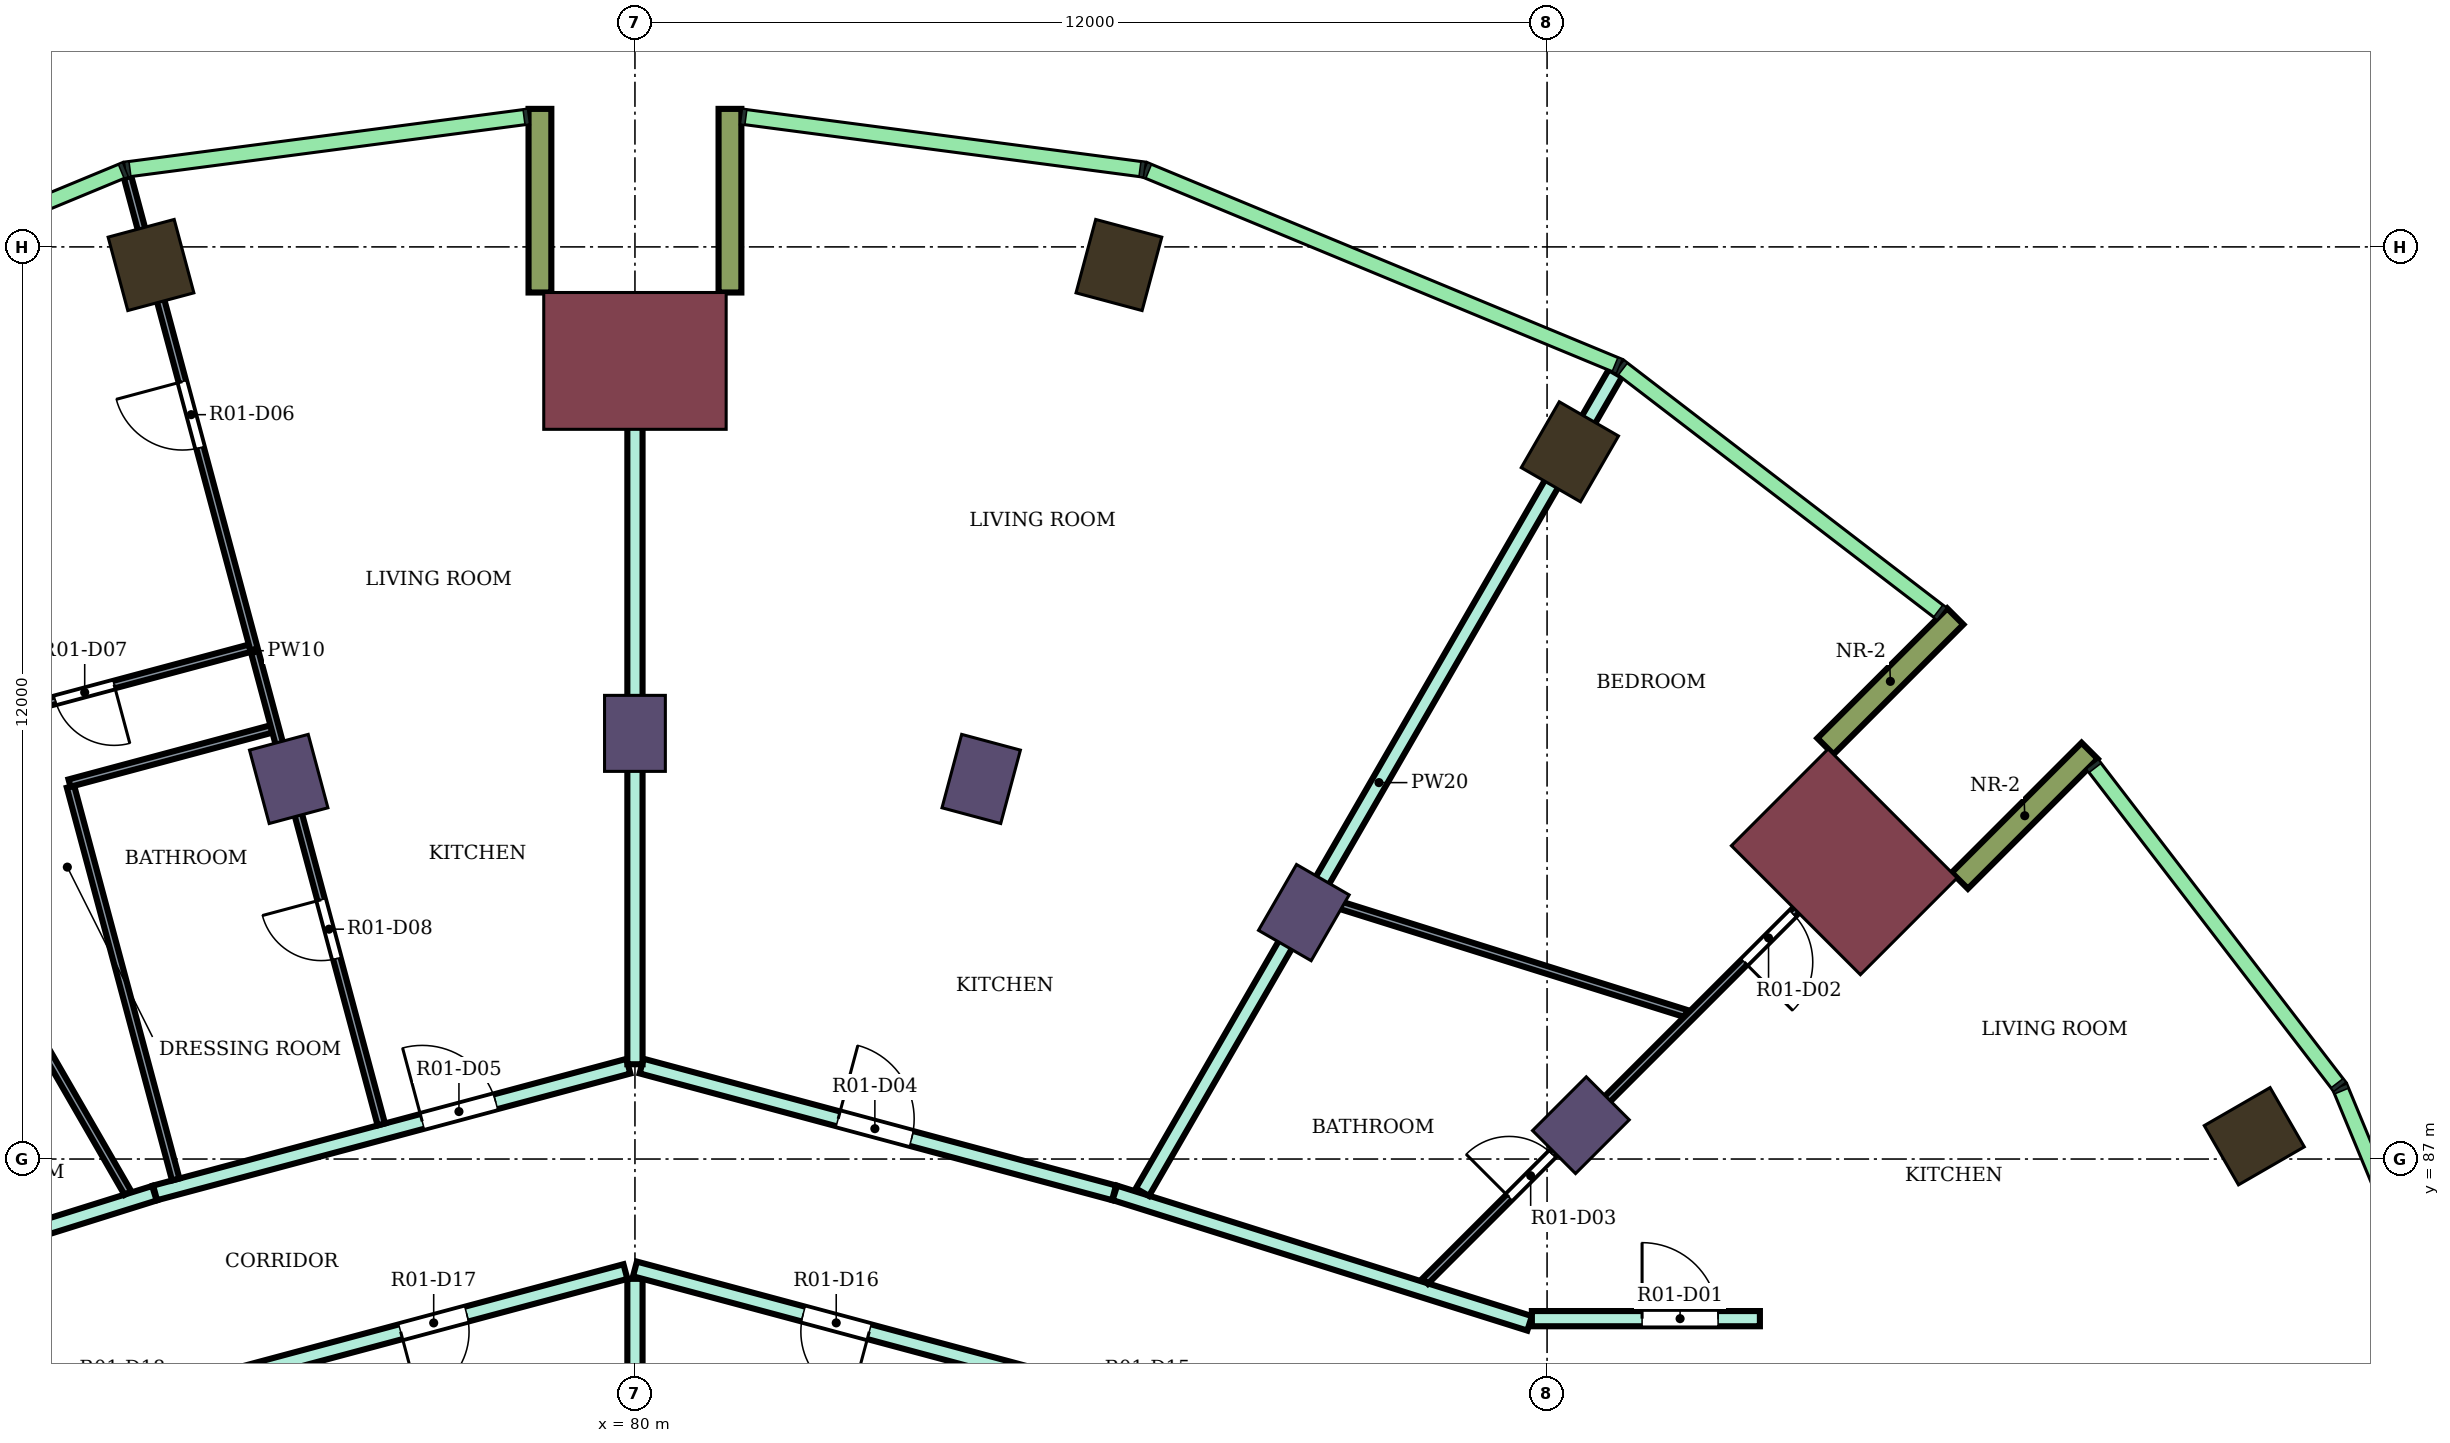
"""IFC4 building model, lengths in metres.
Left out: names, types, materials, properties, quantities, classifications, styles, units other than length and angle.
Written with IfcOpenShell. Run it as: python <this file> out.ifc"""

import sys

from ifc_helpers import new_model, si_unit, direction, frame, frame_2d, origin, origin_2d, place, context, subcontext, project, spatial, rectangle, extrude, element, fill, save


model = new_model("IFC4")
c1 = context("Model", 3, precision=1e-05, world=origin(), true_north=direction((0.0, 1.0)))
c2 = subcontext(c1, "Body", "Model", "MODEL_VIEW")
j1 = project(units=[si_unit("LENGTHUNIT", "METRE"), si_unit("PLANEANGLEUNIT", "RADIAN")], contexts=[c1])
p1 = place(None, origin())
s1 = spatial("IfcSite", under=j1, at=p1, CompositionType="ELEMENT")
p2 = place(p1, origin())
s2 = spatial("IfcBuilding", under=s1, at=p2, CompositionType="ELEMENT")
p3 = place(p2, frame((0.0, 0.0, 157.7)))
s3 = spatial("IfcBuildingStorey", under=s2, at=p3, CompositionType="ELEMENT", Elevation=157.7)
for number, where, z_axis, x_axis in (
    (1, (101.304, 87.3, 0.0), (0.0, 0.0, 1.0), (0.866, 0.5, 0.0)),
    (2, (92.3, 96.304, 0.0), (0.0, 0.0, 1.0), (0.5, 0.866, 0.0)),
    (3, (86.367, 98.762, 0.0), (0.0, 0.0, 1.0), (0.259, 0.966, 0.0)),
    (4, (73.633, 98.762, 0.0), (0.0, 0.0, 1.0), (-0.259, 0.966, 0.0)),
):
    element("IfcColumn", number, at=place(p3, frame(where, z_axis=z_axis, x_axis=x_axis)), inside=s3, PredefinedType="COLUMN", context=c2, shape_type="SweptSolid", body=[
        extrude(rectangle(XDim=1.0, YDim=0.9, at=origin_2d()), origin(), (0.0, 0.0, 1.0), 4.1),
    ])
for number, where, z_axis, x_axis in (
    (5, (92.445, 87.445, 0.0), (0.0, 0.0, 1.0), (0.707, 0.707, 0.0)),
    (6, (88.8, 90.242, 0.0), (0.0, 0.0, 1.0), (0.5, 0.866, 0.0)),
    (7, (84.555, 92.0, 0.0), (0.0, 0.0, 1.0), (0.259, 0.966, 0.0)),
    (8, (80.0, 92.6, 0.0), (0.0, 0.0, 1.0), (0.0, 1.0, 0.0)),
    (9, (75.445, 92.0, 0.0), (0.0, 0.0, 1.0), (-0.259, 0.966, 0.0)),
):
    element("IfcColumn", number, at=place(p3, frame(where, z_axis=z_axis, x_axis=x_axis)), inside=s3, PredefinedType="COLUMN", context=c2, shape_type="SweptSolid", body=[
        extrude(rectangle(XDim=1.0, YDim=0.8, at=origin_2d()), origin(), (0.0, 0.0, 1.0), 4.1),
    ])
for number, where, z_axis, x_axis in (
    (10, (95.91, 90.91, 0.0), (0.0, 0.0, 1.0), (0.707, 0.707, 0.0)),
    (11, (80.0, 97.5, 0.0), (0.0, 0.0, 1.0), (0.0, 1.0, 0.0)),
):
    element("IfcColumn", number, at=place(p3, frame(where, z_axis=z_axis, x_axis=x_axis)), inside=s3, PredefinedType="COLUMN", context=c2, shape_type="SweptSolid", body=[
        extrude(rectangle(XDim=1.8, YDim=2.4, at=origin_2d()), origin(), (0.0, 0.0, 1.0), 4.1),
    ])
for number, where, z_axis, x_axis in (
    (12, (97.43, 90.662, 0.0), (0.0, 0.0, 1.0), (0.707, 0.707, 0.0)),
    (13, (95.662, 92.43, 0.0), (0.0, 0.0, 1.0), (0.707, 0.707, 0.0)),
    (14, (81.25, 98.4, 0.0), (0.0, 0.0, 1.0), (0.0, 1.0, 0.0)),
    (15, (78.75, 98.4, 0.0), (0.0, 0.0, 1.0), (0.0, 1.0, 0.0)),
):
    element("IfcWall", number, at=place(p3, frame(where, z_axis=z_axis, x_axis=x_axis)), inside=s3, PredefinedType="NOTDEFINED", context=c2, shape_type="SweptSolid", body=[
        extrude(rectangle(XDim=2.416, YDim=0.3, at=frame_2d((1.208, 0.0))), origin(), (0.0, 0.0, 1.0), 4.1),
    ])
p4 = place(p3, frame((68.2, 84.834, 0.0), z_axis=(0.0, 0.0, 1.0), x_axis=(0.954272398161, 0.298938438661, 0.0)))
e16 = element("IfcWall", 16, at=p4, inside=s3, PredefinedType="PARTITIONING", context=c2, shape_type="SweptSolid", body=[
    extrude(rectangle(XDim=5.74, YDim=0.2, at=frame_2d((2.87, 0.0))), origin(), (0.0, 0.0, 1.0), 3.65),
])
p5 = place(p3, frame((73.687, 86.554, 0.0), z_axis=(0.0, 0.0, 1.0), x_axis=(0.965999420828, 0.258544230182, 0.0)))
e17 = element("IfcWall", 17, at=p5, inside=s3, PredefinedType="PARTITIONING", context=c2, shape_type="SweptSolid", body=[
    extrude(rectangle(XDim=6.446, YDim=0.2, at=frame_2d((3.223, 0.0))), origin(), (0.0, 0.0, 1.0), 3.65),
])
p6 = place(p5, frame((3.638, 0.0, 0.0)))
e18 = element("IfcOpeningElement", 18, at=p6, cuts=e17, PredefinedType="OPENING", context=c2, shape_type="SweptSolid", body=[
    extrude(rectangle(XDim=1.0, YDim=2.1, at=frame_2d((0.5, 1.05))), frame((0.0, 0.11, 0.0), z_axis=(0.0, -1.0, 0.0), x_axis=(1.0, 0.0, 0.0)), (0.0, 0.0, 1.0), 0.22),
])
p7 = place(p3, frame((74.413, 84.057, 0.0), z_axis=(0.0, 0.0, 1.0), x_axis=(0.965972135939, 0.258646153246, 0.0)))
e19 = element("IfcWall", 19, at=p7, inside=s3, PredefinedType="PARTITIONING", context=c2, shape_type="SweptSolid", body=[
    extrude(rectangle(XDim=5.654, YDim=0.2, at=frame_2d((2.827, 0.0))), origin(), (0.0, 0.0, 1.0), 3.65),
])
p8 = place(p7, frame((2.593, 0.0, 0.0)))
e20 = element("IfcOpeningElement", 20, at=p8, cuts=e19, PredefinedType="OPENING", context=c2, shape_type="SweptSolid", body=[
    extrude(rectangle(XDim=0.9, YDim=2.1, at=frame_2d((0.45, 1.05))), frame((0.0, 0.11, 0.0), z_axis=(0.0, -1.0, 0.0), x_axis=(1.0, 0.0, 0.0)), (0.0, 0.0, 1.0), 0.22),
])
p9 = place(p3, frame((80.0, 82.699, 0.0), z_axis=(0.0, 0.0, 1.0), x_axis=(0.0, 1.0, 0.0)))
e21 = element("IfcWall", 21, at=p9, inside=s3, PredefinedType="PARTITIONING", context=c2, shape_type="SweptSolid", body=[
    extrude(rectangle(XDim=2.725, YDim=0.2, at=frame_2d((1.363, 0.0))), origin(), (0.0, 0.0, 1.0), 3.65),
])
p10 = place(p3, frame((80.0, 85.554, 0.0), z_axis=(0.0, 0.0, 1.0), x_axis=(0.965928989968, -0.258807237802, 0.0)))
e22 = element("IfcWall", 22, at=p10, inside=s3, PredefinedType="PARTITIONING", context=c2, shape_type="SweptSolid", body=[
    extrude(rectangle(XDim=5.774, YDim=0.2, at=frame_2d((2.887, 0.0))), origin(), (0.0, 0.0, 1.0), 3.65),
])
p11 = place(p10, frame((2.292, 0.0, 0.0)))
e23 = element("IfcOpeningElement", 23, at=p11, cuts=e22, PredefinedType="OPENING", context=c2, shape_type="SweptSolid", body=[
    extrude(rectangle(XDim=0.9, YDim=2.1, at=frame_2d((0.45, 1.05))), frame((0.0, 0.11, 0.0), z_axis=(0.0, -1.0, 0.0), x_axis=(1.0, 0.0, 0.0)), (0.0, 0.0, 1.0), 0.22),
])
p12 = place(p3, frame((80.087, 88.223, 0.0), z_axis=(0.0, 0.0, 1.0), x_axis=(0.965852330757, -0.25909317855, 0.0)))
e24 = element("IfcWall", 24, at=p12, inside=s3, PredefinedType="PARTITIONING", context=c2, shape_type="SweptSolid", body=[
    extrude(rectangle(XDim=6.436, YDim=0.2, at=frame_2d((3.218, 0.0))), origin(), (0.0, 0.0, 1.0), 3.65),
])
p13 = place(p12, frame((2.678, 0.0, 0.0)))
e25 = element("IfcOpeningElement", 25, at=p13, cuts=e24, PredefinedType="OPENING", context=c2, shape_type="SweptSolid", body=[
    extrude(rectangle(XDim=1.0, YDim=2.1, at=frame_2d((0.5, 1.05))), frame((0.0, 0.11, 0.0), z_axis=(0.0, -1.0, 0.0), x_axis=(1.0, 0.0, 0.0)), (0.0, 0.0, 1.0), 0.22),
])
p14 = place(p3, frame((80.0, 88.247, 0.0), z_axis=(0.0, 0.0, 1.0), x_axis=(0.0, 1.0, 0.0)))
e26 = element("IfcWall", 26, at=p14, inside=s3, PredefinedType="PARTITIONING", context=c2, shape_type="SweptSolid", body=[
    extrude(rectangle(XDim=9.952, YDim=0.2, at=frame_2d((4.976, 0.0))), origin(), (0.0, 0.0, 1.0), 3.65),
])
p15 = place(p3, frame((86.313, 86.555, 0.0), z_axis=(0.0, 0.0, 1.0), x_axis=(0.953919398959, -0.300062960544, 0.0)))
e27 = element("IfcWall", 27, at=p15, inside=s3, PredefinedType="PARTITIONING", context=c2, shape_type="SweptSolid", body=[
    extrude(rectangle(XDim=5.721, YDim=0.2, at=frame_2d((2.86, 0.0))), origin(), (0.0, 0.0, 1.0), 3.65),
])
p16 = place(p3, frame((86.677, 86.564, 0.0), z_axis=(0.0, 0.0, 1.0), x_axis=(0.500120377296, 0.865955892764, 0.0)))
e28 = element("IfcWall", 28, at=p16, inside=s3, PredefinedType="PARTITIONING", context=c2, shape_type="SweptSolid", body=[
    extrude(rectangle(XDim=12.445, YDim=0.2, at=frame_2d((6.222, 0.0))), origin(), (0.0, 0.0, 1.0), 3.65),
])
p17 = place(p3, frame((91.8, 84.9, 0.0), z_axis=(0.0, 0.0, 1.0), x_axis=(1.0, 0.0, 0.0)))
e29 = element("IfcWall", 29, at=p17, inside=s3, PredefinedType="PARTITIONING", context=c2, shape_type="SweptSolid", body=[
    extrude(rectangle(XDim=3.0, YDim=0.2, at=frame_2d((1.5, 0.0))), origin(), (0.0, 0.0, 1.0), 3.65),
])
p18 = place(p17, frame((1.45, 0.0, 0.0)))
e30 = element("IfcOpeningElement", 30, at=p18, cuts=e29, PredefinedType="OPENING", context=c2, shape_type="SweptSolid", body=[
    extrude(rectangle(XDim=1.0, YDim=2.1, at=frame_2d((0.5, 1.05))), frame((0.0, 0.11, 0.0), z_axis=(0.0, -1.0, 0.0), x_axis=(1.0, 0.0, 0.0)), (0.0, 0.0, 1.0), 0.22),
])
p19 = place(p3, frame((67.101, 97.342, 0.0), z_axis=(0.0, 0.0, 1.0), x_axis=(0.499929451451, -0.866066131177, 0.0)))
e31 = element("IfcWall", 31, at=p19, inside=s3, PredefinedType="PARTITIONING", context=c2, shape_type="SweptSolid", body=[
    extrude(rectangle(XDim=12.456, YDim=0.1, at=frame_2d((6.228, 0.0))), origin(), (0.0, 0.0, 1.0), 3.65),
])
p20 = place(p19, frame((2.434, 0.0, 0.0)))
e32 = element("IfcOpeningElement", 32, at=p20, cuts=e31, PredefinedType="OPENING", context=c2, shape_type="SweptSolid", body=[
    extrude(rectangle(XDim=0.9, YDim=2.1, at=frame_2d((0.45, 1.05))), frame((0.0, 0.06, 0.0), z_axis=(0.0, -1.0, 0.0), x_axis=(1.0, 0.0, 0.0)), (0.0, 0.0, 1.0), 0.12),
])
p21 = place(p3, frame((70.019, 92.405, 0.0), z_axis=(0.0, 0.0, 1.0), x_axis=(0.965982744428, 0.258606530209, 0.0)))
e33 = element("IfcWall", 33, at=p21, inside=s3, PredefinedType="PARTITIONING", context=c2, shape_type="SweptSolid", body=[
    extrude(rectangle(XDim=5.087, YDim=0.1, at=frame_2d((2.543, 0.0))), origin(), (0.0, 0.0, 1.0), 3.65),
])
p22 = place(p21, frame((2.438, 0.0, 0.0)))
e34 = element("IfcOpeningElement", 34, at=p22, cuts=e33, PredefinedType="OPENING", context=c2, shape_type="SweptSolid", body=[
    extrude(rectangle(XDim=0.8, YDim=2.1, at=frame_2d((0.4, 1.05))), frame((0.0, 0.06, 0.0), z_axis=(0.0, -1.0, 0.0), x_axis=(1.0, 0.0, 0.0)), (0.0, 0.0, 1.0), 0.12),
])
p23 = place(p3, frame((72.574, 91.898, 0.0), z_axis=(0.0, 0.0, 1.0), x_axis=(0.258739127054, -0.965947236722, 0.0)))
e35 = element("IfcWall", 35, at=p23, inside=s3, PredefinedType="PARTITIONING", context=c2, shape_type="SweptSolid", body=[
    extrude(rectangle(XDim=5.349, YDim=0.1, at=frame_2d((2.675, 0.0))), origin(), (0.0, 0.0, 1.0), 3.65),
])
p24 = place(p3, frame((72.561, 91.946, 0.0), z_axis=(0.0, 0.0, 1.0), x_axis=(0.96591000446, 0.258878085754, 0.0)))
e36 = element("IfcWall", 36, at=p24, inside=s3, PredefinedType="PARTITIONING", context=c2, shape_type="SweptSolid", body=[
    extrude(rectangle(XDim=2.75, YDim=0.1, at=frame_2d((1.375, 0.0))), origin(), (0.0, 0.0, 1.0), 3.65),
])
p25 = place(p3, frame((73.324, 99.92, 0.0), z_axis=(0.0, 0.0, 1.0), x_axis=(0.258710550884, -0.965954890697, 0.0)))
e37 = element("IfcWall", 37, at=p25, inside=s3, PredefinedType="PARTITIONING", context=c2, shape_type="SweptSolid", body=[
    extrude(rectangle(XDim=12.904, YDim=0.1, at=frame_2d((6.452, 0.0))), origin(), (0.0, 0.0, 1.0), 3.65),
])
p26 = place(p25, frame((2.787, 0.0, 0.0)))
e38 = element("IfcOpeningElement", 38, at=p26, cuts=e37, PredefinedType="OPENING", context=c2, shape_type="SweptSolid", body=[
    extrude(rectangle(XDim=0.9, YDim=2.1, at=frame_2d((0.45, 1.05))), frame((0.0, 0.06, 0.0), z_axis=(0.0, -1.0, 0.0), x_axis=(1.0, 0.0, 0.0)), (0.0, 0.0, 1.0), 0.12),
])
p27 = place(p25, frame((9.844, 0.0, 0.0)))
e39 = element("IfcOpeningElement", 39, at=p27, cuts=e37, PredefinedType="OPENING", context=c2, shape_type="SweptSolid", body=[
    extrude(rectangle(XDim=0.8, YDim=2.1, at=frame_2d((0.4, 1.05))), frame((0.0, 0.06, 0.0), z_axis=(0.0, -1.0, 0.0), x_axis=(1.0, 0.0, 0.0)), (0.0, 0.0, 1.0), 0.12),
])
p28 = place(p3, frame((89.026, 90.419, 0.0), z_axis=(0.0, 0.0, 1.0), x_axis=(0.954207609901, -0.299145177475, 0.0)))
e40 = element("IfcWall", 40, at=p28, inside=s3, PredefinedType="PARTITIONING", context=c2, shape_type="SweptSolid", body=[
    extrude(rectangle(XDim=5.031, YDim=0.1, at=frame_2d((2.516, 0.0))), origin(), (0.0, 0.0, 1.0), 3.65),
])
p29 = place(p3, frame((90.396, 85.393, 0.0), z_axis=(0.0, 0.0, 1.0), x_axis=(0.707236031471, 0.706977507273, 0.0)))
e41 = element("IfcWall", 41, at=p29, inside=s3, PredefinedType="PARTITIONING", context=c2, shape_type="SweptSolid", body=[
    extrude(rectangle(XDim=8.499, YDim=0.1, at=frame_2d((4.25, 0.0))), origin(), (0.0, 0.0, 1.0), 3.65),
])
p30 = place(p29, frame((5.937, 0.0, 0.0)))
e42 = element("IfcOpeningElement", 42, at=p30, cuts=e41, PredefinedType="OPENING", context=c2, shape_type="SweptSolid", body=[
    extrude(rectangle(XDim=0.9, YDim=2.1, at=frame_2d((0.45, 1.05))), frame((0.0, 0.06, 0.0), z_axis=(0.0, -1.0, 0.0), x_axis=(1.0, 0.0, 0.0)), (0.0, 0.0, 1.0), 0.12),
])
p31 = place(p29, frame((1.562, 0.0, 0.0)))
e43 = element("IfcOpeningElement", 43, at=p31, cuts=e41, PredefinedType="OPENING", context=c2, shape_type="SweptSolid", body=[
    extrude(rectangle(XDim=0.8, YDim=2.1, at=frame_2d((0.4, 1.05))), frame((0.0, 0.06, 0.0), z_axis=(0.0, -1.0, 0.0), x_axis=(1.0, 0.0, 0.0)), (0.0, 0.0, 1.0), 0.12),
])
p32 = place(p18, origin())
e44 = element("IfcDoor", 44, at=p32, inside=s3, OperationType="SINGLE_SWING_LEFT", PredefinedType="DOOR", context=c2, shape_type="SweptSolid", body=[
    extrude(rectangle(XDim=1.0, YDim=2.1, at=frame_2d((0.5, 1.05))), frame((0.0, 0.025, 0.0), z_axis=(0.0, -1.0, 0.0), x_axis=(1.0, 0.0, 0.0)), (0.0, 0.0, 1.0), 0.05),
])
fill(e30, e44)
p33 = place(p30, frame((0.9, 0.0, 0.0), z_axis=(0.0, 0.0, 1.0), x_axis=(-1.0, 0.0, 0.0)))
e45 = element("IfcDoor", 45, at=p33, inside=s3, OperationType="SINGLE_SWING_RIGHT", PredefinedType="DOOR", context=c2, shape_type="SweptSolid", body=[
    extrude(rectangle(XDim=0.9, YDim=2.1, at=frame_2d((0.45, 1.05))), frame((0.0, 0.025, 0.0), z_axis=(0.0, -1.0, 0.0), x_axis=(1.0, 0.0, 0.0)), (0.0, 0.0, 1.0), 0.05),
])
fill(e42, e45)
p34 = place(p31, origin())
e46 = element("IfcDoor", 46, at=p34, inside=s3, OperationType="SINGLE_SWING_LEFT", PredefinedType="DOOR", context=c2, shape_type="SweptSolid", body=[
    extrude(rectangle(XDim=0.8, YDim=2.1, at=frame_2d((0.4, 1.05))), frame((0.0, 0.025, 0.0), z_axis=(0.0, -1.0, 0.0), x_axis=(1.0, 0.0, 0.0)), (0.0, 0.0, 1.0), 0.05),
])
fill(e43, e46)
p35 = place(p13, origin())
e47 = element("IfcDoor", 47, at=p35, inside=s3, OperationType="SINGLE_SWING_LEFT", PredefinedType="DOOR", context=c2, shape_type="SweptSolid", body=[
    extrude(rectangle(XDim=1.0, YDim=2.1, at=frame_2d((0.5, 1.05))), frame((0.0, 0.025, 0.0), z_axis=(0.0, -1.0, 0.0), x_axis=(1.0, 0.0, 0.0)), (0.0, 0.0, 1.0), 0.05),
])
fill(e25, e47)
p36 = place(p6, origin())
e48 = element("IfcDoor", 48, at=p36, inside=s3, OperationType="SINGLE_SWING_LEFT", PredefinedType="DOOR", context=c2, shape_type="SweptSolid", body=[
    extrude(rectangle(XDim=1.0, YDim=2.1, at=frame_2d((0.5, 1.05))), frame((0.0, 0.025, 0.0), z_axis=(0.0, -1.0, 0.0), x_axis=(1.0, 0.0, 0.0)), (0.0, 0.0, 1.0), 0.05),
])
fill(e18, e48)
p37 = place(p26, frame((0.9, 0.0, 0.0), z_axis=(0.0, 0.0, 1.0), x_axis=(-1.0, 0.0, 0.0)))
e49 = element("IfcDoor", 49, at=p37, inside=s3, OperationType="SINGLE_SWING_RIGHT", PredefinedType="DOOR", context=c2, shape_type="SweptSolid", body=[
    extrude(rectangle(XDim=0.9, YDim=2.1, at=frame_2d((0.45, 1.05))), frame((0.0, 0.025, 0.0), z_axis=(0.0, -1.0, 0.0), x_axis=(1.0, 0.0, 0.0)), (0.0, 0.0, 1.0), 0.05),
])
fill(e38, e49)
p38 = place(p22, frame((0.8, 0.0, 0.0), z_axis=(0.0, 0.0, 1.0), x_axis=(-1.0, 0.0, 0.0)))
e50 = element("IfcDoor", 50, at=p38, inside=s3, OperationType="SINGLE_SWING_LEFT", PredefinedType="DOOR", context=c2, shape_type="SweptSolid", body=[
    extrude(rectangle(XDim=0.8, YDim=2.1, at=frame_2d((0.4, 1.05))), frame((0.0, 0.025, 0.0), z_axis=(0.0, -1.0, 0.0), x_axis=(1.0, 0.0, 0.0)), (0.0, 0.0, 1.0), 0.05),
])
fill(e34, e50)
p39 = place(p27, frame((0.8, 0.0, 0.0), z_axis=(0.0, 0.0, 1.0), x_axis=(-1.0, 0.0, 0.0)))
e51 = element("IfcDoor", 51, at=p39, inside=s3, OperationType="SINGLE_SWING_RIGHT", PredefinedType="DOOR", context=c2, shape_type="SweptSolid", body=[
    extrude(rectangle(XDim=0.8, YDim=2.1, at=frame_2d((0.4, 1.05))), frame((0.0, 0.025, 0.0), z_axis=(0.0, -1.0, 0.0), x_axis=(1.0, 0.0, 0.0)), (0.0, 0.0, 1.0), 0.05),
])
fill(e39, e51)
p40 = place(p11, frame((0.9, 0.0, 0.0), z_axis=(0.0, 0.0, 1.0), x_axis=(-1.0, 0.0, 0.0)))
e52 = element("IfcDoor", 52, at=p40, inside=s3, OperationType="SINGLE_SWING_LEFT", PredefinedType="DOOR", context=c2, shape_type="SweptSolid", body=[
    extrude(rectangle(XDim=0.9, YDim=2.1, at=frame_2d((0.45, 1.05))), frame((0.0, 0.025, 0.0), z_axis=(0.0, -1.0, 0.0), x_axis=(1.0, 0.0, 0.0)), (0.0, 0.0, 1.0), 0.05),
])
fill(e23, e52)
p41 = place(p8, frame((0.9, 0.0, 0.0), z_axis=(0.0, 0.0, 1.0), x_axis=(-1.0, 0.0, 0.0)))
e53 = element("IfcDoor", 53, at=p41, inside=s3, OperationType="SINGLE_SWING_RIGHT", PredefinedType="DOOR", context=c2, shape_type="SweptSolid", body=[
    extrude(rectangle(XDim=0.9, YDim=2.1, at=frame_2d((0.45, 1.05))), frame((0.0, 0.025, 0.0), z_axis=(0.0, -1.0, 0.0), x_axis=(1.0, 0.0, 0.0)), (0.0, 0.0, 1.0), 0.05),
])
fill(e20, e53)
save(model, sys.argv[1])
